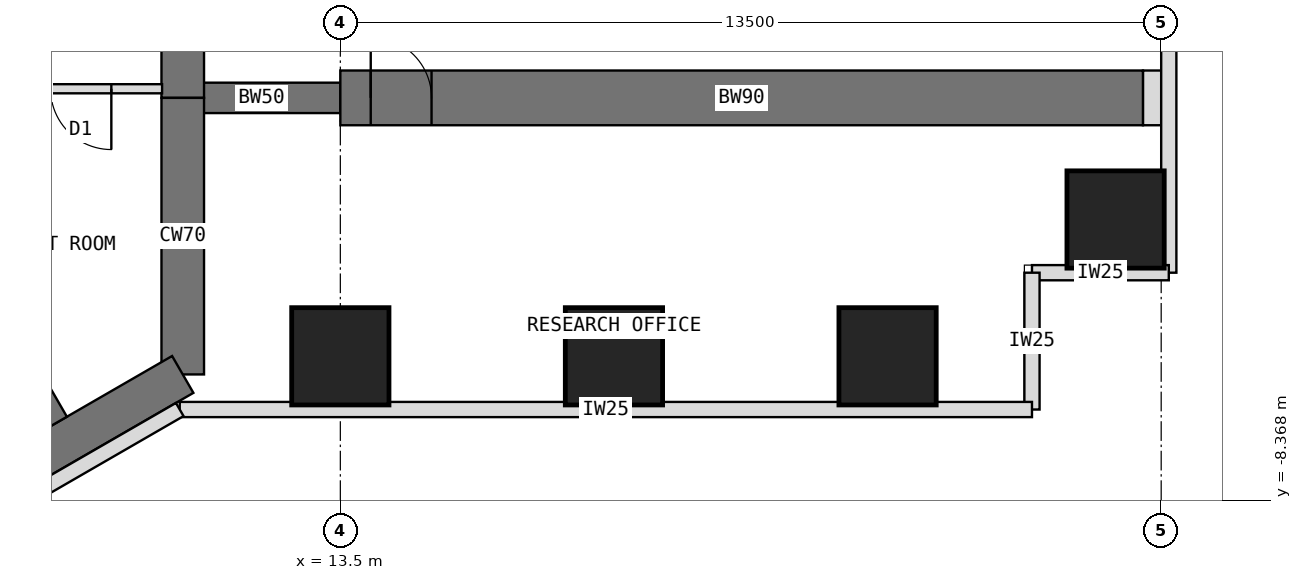
"""IFC4 building model, lengths in metres.
Left out: names, types, materials, properties, quantities, classifications, styles, units other than length and angle.
Written with IfcOpenShell. Run it as: python <this file> out.ifc"""

import sys

from ifc_helpers import new_model, si_unit, direction, frame, frame_2d, origin, origin_2d, place, context, subcontext, project, spatial, rectangle, extrude, element, fill, save


model = new_model("IFC4")
c1 = context("Model", 3, precision=1e-05, world=origin(), true_north=direction((0.0, 1.0)))
c2 = subcontext(c1, "Body", "Model", "MODEL_VIEW")
j1 = project(units=[si_unit("LENGTHUNIT", "METRE"), si_unit("PLANEANGLEUNIT", "RADIAN")], contexts=[c1])
p1 = place(None, origin())
s1 = spatial("IfcSite", under=j1, at=p1, CompositionType="ELEMENT")
p2 = place(p1, origin())
s2 = spatial("IfcBuilding", under=s1, at=p2, CompositionType="ELEMENT")
p3 = place(p2, frame((0.0, 0.0, 15.5)))
s3 = spatial("IfcBuildingStorey", under=s2, at=p3, CompositionType="ELEMENT", Elevation=15.5)
p4 = place(p3, frame((10.908, -6.298, 0.0), z_axis=(0.0, 0.0, 1.0), x_axis=(0.0, 1.0, 0.0)))
e1 = element("IfcWall", 1, at=p4, inside=s3, PredefinedType="SHEAR", context=c2, shape_type="SweptSolid", body=[
    extrude(rectangle(XDim=4.548, YDim=0.7, at=frame_2d((2.274, 0.0))), origin(), (0.0, 0.0, 1.0), 5.0),
])
p5 = place(p3, frame((10.908, -1.75, 0.0), z_axis=(0.0, 0.0, 1.0), x_axis=(0.0, 1.0, 0.0)))
e2 = element("IfcWall", 2, at=p5, inside=s3, PredefinedType="SHEAR", context=c2, shape_type="SweptSolid", body=[
    extrude(rectangle(XDim=3.5, YDim=0.7, at=frame_2d((1.75, 0.0))), origin(), (0.0, 0.0, 1.0), 5.0),
])
p6 = place(p5, frame((0.85, 0.0, 0.0)))
e3 = element("IfcOpeningElement", 3, at=p6, cuts=e2, PredefinedType="OPENING", context=c2, shape_type="SweptSolid", body=[
    extrude(rectangle(XDim=1.8, YDim=2.1, at=frame_2d((0.9, 1.05))), frame((0.0, 0.36, 0.0), z_axis=(0.0, -1.0, 0.0), x_axis=(1.0, 0.0, 0.0)), (0.0, 0.0, 1.0), 0.72),
])
p7 = place(p3, frame((0.0, -12.596, 0.0), z_axis=(0.0, 0.0, 1.0), x_axis=(0.866021940709, 0.500005998175, 0.0)))
e4 = element("IfcWall", 4, at=p7, inside=s3, PredefinedType="SHEAR", context=c2, shape_type="SweptSolid", body=[
    extrude(rectangle(XDim=12.596, YDim=0.7, at=frame_2d((6.298, 0.0))), origin(), (0.0, 0.0, 1.0), 5.0),
])
p8 = place(p3, frame((10.908, -1.75, 0.0), z_axis=(0.0, 0.0, 1.0), x_axis=(1.0, 0.0, 0.0)))
e5 = element("IfcWall", 5, at=p8, inside=s3, PredefinedType="SHEAR", context=c2, shape_type="SweptSolid", body=[
    extrude(rectangle(XDim=2.592, YDim=0.5, at=frame_2d((1.296, 0.0))), origin(), (0.0, 0.0, 1.0), 5.0),
])
p9 = place(p3, frame((13.5, -1.75, 0.0), z_axis=(0.0, 0.0, 1.0), x_axis=(1.0, 0.0, 0.0)))
e6 = element("IfcWall", 6, at=p9, inside=s3, PredefinedType="SHEAR", context=c2, shape_type="SweptSolid", body=[
    extrude(rectangle(XDim=13.2, YDim=0.9, at=frame_2d((6.6, 0.0))), origin(), (0.0, 0.0, 1.0), 5.0),
])
p10 = place(p9, frame((0.5, 0.0, 0.0)))
e7 = element("IfcOpeningElement", 7, at=p10, cuts=e6, PredefinedType="OPENING", context=c2, shape_type="SweptSolid", body=[
    extrude(rectangle(XDim=1.0, YDim=2.1, at=frame_2d((0.5, 1.05))), frame((0.0, 0.46, 0.0), z_axis=(0.0, -1.0, 0.0), x_axis=(1.0, 0.0, 0.0)), (0.0, 0.0, 1.0), 0.92),
])
for number, where, z_axis, x_axis in (
    (8, (13.5, -6.0, 0.0), (0.0, 0.0, 1.0), (1.0, 0.0, 0.0)),
    (9, (18.0, -6.0, 0.0), (0.0, 0.0, 1.0), (1.0, 0.0, 0.0)),
    (10, (22.5, -6.0, 0.0), (0.0, 0.0, 1.0), (1.0, 0.0, 0.0)),
    (11, (26.25, -3.75, 0.0), (0.0, 0.0, 1.0), (1.0, 0.0, 0.0)),
):
    element("IfcColumn", number, at=place(p3, frame(where, z_axis=z_axis, x_axis=x_axis)), inside=s3, PredefinedType="COLUMN", context=c2, shape_type="SweptSolid", body=[
        extrude(rectangle(XDim=1.6, YDim=1.6, at=origin_2d()), origin(), (0.0, 0.0, 1.0), 5.0),
    ])
p11 = place(p3, frame((26.7, -1.75, 0.0), z_axis=(0.0, 0.0, 1.0), x_axis=(1.0, 0.0, 0.0)))
e12 = element("IfcWall", 12, at=p11, inside=s3, PredefinedType="PARTITIONING", context=c2, shape_type="SweptSolid", body=[
    extrude(rectangle(XDim=0.3, YDim=0.9, at=frame_2d((0.15, 0.0))), origin(), (0.0, 0.0, 1.0), 4.8),
])
p12 = place(p3, frame((5.901, -2.02, 0.0), z_axis=(0.0, 0.0, 1.0), x_axis=(0.500002627198, -0.866023886965, 0.0)))
e13 = element("IfcWall", 13, at=p12, inside=s3, PredefinedType="SHEAR", context=c2, shape_type="SweptSolid", body=[
    extrude(rectangle(XDim=5.858, YDim=0.4, at=frame_2d((2.929, 0.0))), origin(), (0.0, 0.0, 1.0), 5.0),
])
p13 = place(p3, frame((10.568, -1.6, 0.0), z_axis=(0.0, 0.0, 1.0), x_axis=(-1.0, 0.0, 0.0)))
e14 = element("IfcWall", 14, at=p13, inside=s3, PredefinedType="PARTITIONING", context=c2, shape_type="SweptSolid", body=[
    extrude(rectangle(XDim=4.469, YDim=0.15, at=frame_2d((2.234, 0.0))), origin(), (0.0, 0.0, 1.0), 4.8),
])
p14 = place(p13, frame((0.834, 0.0, 0.0)))
e15 = element("IfcOpeningElement", 15, at=p14, cuts=e14, PredefinedType="OPENING", context=c2, shape_type="SweptSolid", body=[
    extrude(rectangle(XDim=1.0, YDim=2.1, at=frame_2d((0.5, 1.05))), frame((0.0, 0.085, 0.0), z_axis=(0.0, -1.0, 0.0), x_axis=(1.0, 0.0, 0.0)), (0.0, 0.0, 1.0), 0.17),
])
p15 = place(p3, frame((27.0, -13.5, 0.0), z_axis=(0.0, 0.0, 1.0), x_axis=(0.0, 1.0, 0.0)))
e16 = element("IfcWall", 16, at=p15, inside=s3, PredefinedType="PARTITIONING", context=c2, shape_type="SweptSolid", body=[
    extrude(rectangle(XDim=8.7, YDim=0.2, at=frame_2d((4.35, 0.0))), origin(), (0.0, 0.0, 1.0), 4.65),
])
p16 = place(p3, frame((27.125, 4.625, 0.0), z_axis=(0.0, 0.0, 1.0), x_axis=(0.0, -1.0, 0.0)))
e17 = element("IfcWall", 17, at=p16, inside=s3, PredefinedType="STANDARD", context=c2, shape_type="SweptSolid", body=[
    extrude(rectangle(XDim=9.25, YDim=0.25, at=frame_2d((4.625, 0.0))), origin(), (0.0, 0.0, 1.0), 4.65),
])
p17 = place(p16, frame((3.725, 0.0, 0.0)))
e18 = element("IfcOpeningElement", 18, at=p17, cuts=e17, PredefinedType="OPENING", context=c2, shape_type="SweptSolid", body=[
    extrude(rectangle(XDim=1.8, YDim=2.1, at=frame_2d((0.9, 1.05))), frame((0.0, 0.135, 0.0), z_axis=(0.0, -1.0, 0.0), x_axis=(1.0, 0.0, 0.0)), (0.0, 0.0, 1.0), 0.27),
])
for number, where, z_axis, x_axis in (
    (19, (27.125, -4.625, 0.0), (0.0, 0.0, 1.0), (-1.0, 0.0, 0.0)),
    (20, (24.875, -4.625, 0.0), (0.0, 0.0, 1.0), (0.0, -1.0, 0.0)),
):
    element("IfcWall", number, at=place(p3, frame(where, z_axis=z_axis, x_axis=x_axis)), inside=s3, PredefinedType="STANDARD", context=c2, shape_type="SweptSolid", body=[
        extrude(rectangle(XDim=2.25, YDim=0.25, at=frame_2d((1.125, 0.0))), origin(), (0.0, 0.0, 1.0), 4.65),
    ])
p18 = place(p3, frame((24.875, -6.875, 0.0), z_axis=(0.0, 0.0, 1.0), x_axis=(-1.0, 0.0, 0.0)))
e21 = element("IfcWall", 21, at=p18, inside=s3, PredefinedType="STANDARD", context=c2, shape_type="SweptSolid", body=[
    extrude(rectangle(XDim=14.016, YDim=0.25, at=frame_2d((7.008, 0.0))), origin(), (0.0, 0.0, 1.0), 4.65),
])
p19 = place(p3, frame((10.859, -6.875, 0.0), z_axis=(0.0, 0.0, 1.0), x_axis=(-0.866027502425, -0.499996365031, 0.0)))
e22 = element("IfcWall", 22, at=p19, inside=s3, PredefinedType="STANDARD", context=c2, shape_type="SweptSolid", body=[
    extrude(rectangle(XDim=11.933, YDim=0.25, at=frame_2d((5.967, 0.0))), origin(), (0.0, 0.0, 1.0), 4.65),
])
p20 = place(p14, origin())
e23 = element("IfcDoor", 23, at=p20, inside=s3, OperationType="SINGLE_SWING_LEFT", PredefinedType="DOOR", context=c2, shape_type="SweptSolid", body=[
    extrude(rectangle(XDim=1.0, YDim=2.1, at=frame_2d((0.5, 1.05))), frame((0.0, 0.025, 0.0), z_axis=(0.0, -1.0, 0.0), x_axis=(1.0, 0.0, 0.0)), (0.0, 0.0, 1.0), 0.05),
])
fill(e15, e23)
p21 = place(p10, origin())
e24 = element("IfcDoor", 24, at=p21, inside=s3, OperationType="SINGLE_SWING_LEFT", PredefinedType="DOOR", context=c2, shape_type="SweptSolid", body=[
    extrude(rectangle(XDim=0.92, YDim=2.06, at=frame_2d((0.5, 1.03))), frame((0.0, 0.025, 0.0), z_axis=(0.0, -1.0, 0.0), x_axis=(1.0, 0.0, 0.0)), (0.0, 0.0, 1.0), 0.05),
    extrude(rectangle(XDim=0.04, YDim=2.1, at=frame_2d((0.02, 1.05))), frame((0.0, 0.45, 0.0), z_axis=(0.0, -1.0, 0.0), x_axis=(1.0, 0.0, 0.0)), (0.0, 0.0, 1.0), 0.899),
    extrude(rectangle(XDim=0.04, YDim=2.1, at=frame_2d((0.98, 1.05))), frame((0.0, 0.45, 0.0), z_axis=(0.0, -1.0, 0.0), x_axis=(1.0, 0.0, 0.0)), (0.0, 0.0, 1.0), 0.899),
    extrude(rectangle(XDim=0.92, YDim=0.04, at=frame_2d((0.5, 2.08))), frame((0.0, 0.45, 0.0), z_axis=(0.0, -1.0, 0.0), x_axis=(1.0, 0.0, 0.0)), (0.0, 0.0, 1.0), 0.899),
])
fill(e7, e24)
save(model, sys.argv[1])
